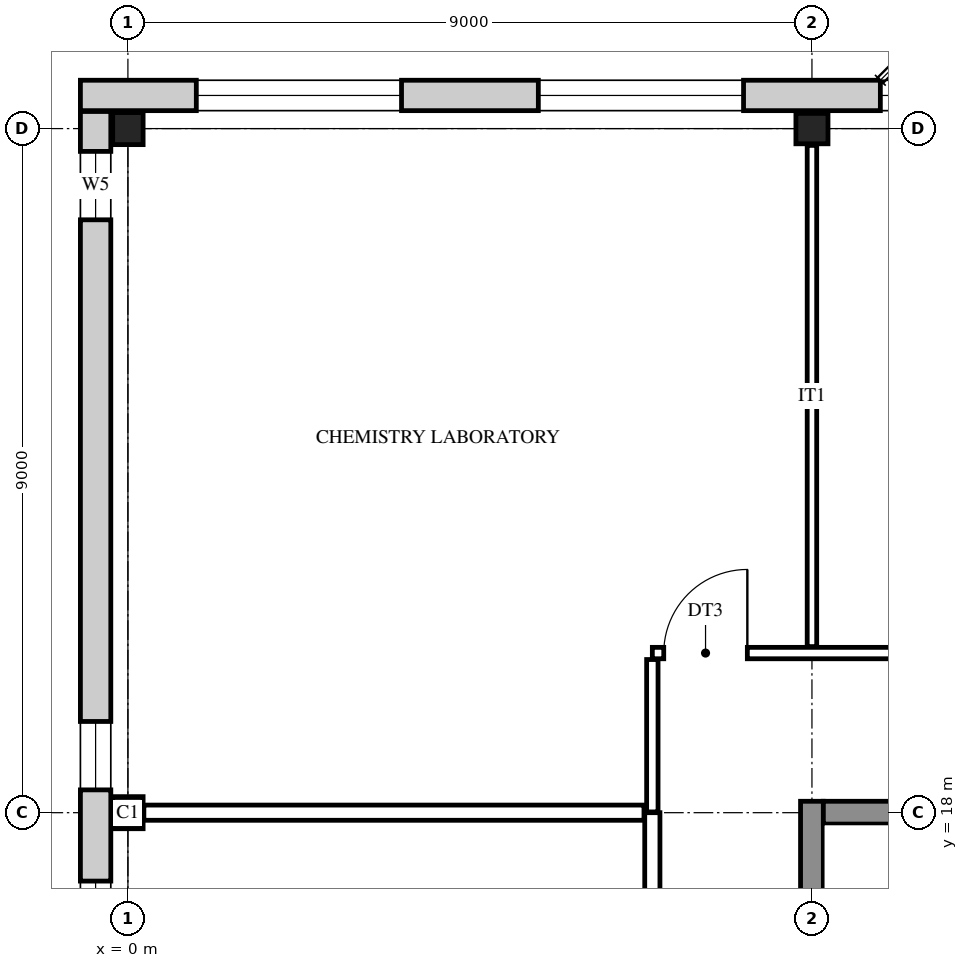
"""IFC4 building model, lengths in metres.
Left out: names, types, materials, properties, quantities, classifications, styles, units other than length and angle.
Written with IfcOpenShell. Run it as: python <this file> out.ifc"""

import sys

from ifc_helpers import new_model, si_unit, direction, frame, frame_2d, origin, origin_2d, place, context, subcontext, project, spatial, rectangle, i_section, extrude, element, fill, save


model = new_model("IFC4")
c1 = context("Model", 3, precision=1e-05, world=origin(), true_north=direction((0.0, 1.0)))
c2 = subcontext(c1, "Body", "Model", "MODEL_VIEW")
j1 = project(units=[si_unit("LENGTHUNIT", "METRE"), si_unit("PLANEANGLEUNIT", "RADIAN")], contexts=[c1])
p1 = place(None, origin())
s1 = spatial("IfcSite", under=j1, at=p1, CompositionType="ELEMENT")
p2 = place(p1, origin())
s2 = spatial("IfcBuilding", under=s1, at=p2, CompositionType="ELEMENT")
p3 = place(p2, frame((0.0, 0.0, 19.2)))
s3 = spatial("IfcBuildingStorey", under=s2, at=p3, CompositionType="ELEMENT", Elevation=19.2)
for number, where, z_axis, x_axis in (
    (1, (0.0, 18.0, 0.0), (0.0, 0.0, 1.0), (1.0, 0.0, 0.0)),
    (2, (0.0, 27.0, 0.0), (0.0, 0.0, 1.0), (1.0, 0.0, 0.0)),
    (3, (9.0, 27.0, 0.0), (0.0, 0.0, 1.0), (0.0, 1.0, 0.0)),
):
    element("IfcColumn", number, at=place(p3, frame(where, z_axis=z_axis, x_axis=x_axis)), inside=s3, PredefinedType="COLUMN", context=c2, shape_type="SweptSolid", body=[
        extrude(i_section(OverallWidth=0.4, OverallDepth=0.422, WebThickness=0.028, FlangeThickness=0.036, at=origin_2d()), origin(), (0.0, 0.0, 1.0), 4.2),
    ])
p4 = place(p3, frame((9.0, 8.85, 0.0), z_axis=(0.0, 0.0, 1.0), x_axis=(0.0, 1.0, 0.0)))
e4 = element("IfcWall", 4, at=p4, inside=s3, PredefinedType="SHEAR", context=c2, shape_type="SweptSolid", body=[
    extrude(rectangle(XDim=9.3, YDim=0.3, at=frame_2d((4.65, 0.0))), origin(), (0.0, 0.0, 1.0), 4.2),
])
p5 = place(p3, frame((9.15, 18.0, 0.0), z_axis=(0.0, 0.0, 1.0), x_axis=(1.0, 0.0, 0.0)))
e5 = element("IfcWall", 5, at=p5, inside=s3, PredefinedType="SHEAR", context=c2, shape_type="SweptSolid", body=[
    extrude(rectangle(XDim=4.2, YDim=0.3, at=frame_2d((2.1, 0.0))), origin(), (0.0, 0.0, 1.0), 4.2),
])
p6 = place(p3, frame((-0.425, -0.225, 0.0), z_axis=(0.0, 0.0, 1.0), x_axis=(0.0, 1.0, 0.0)))
e6 = element("IfcWall", 6, at=p6, inside=s3, PredefinedType="STANDARD", context=c2, shape_type="SweptSolid", body=[
    extrude(rectangle(XDim=27.45, YDim=0.4, at=frame_2d((13.725, 0.0))), origin(), (0.0, 0.0, 1.0), 4.2),
])
p7 = place(p6, frame((0.525, 0.0, 0.9)))
e7 = element("IfcOpeningElement", 7, at=p7, cuts=e6, PredefinedType="OPENING", context=c2, shape_type="SweptSolid", body=[
    extrude(rectangle(XDim=0.9, YDim=2.0, at=frame_2d((0.45, 1.0))), frame((0.0, 0.21, 0.0), z_axis=(0.0, -1.0, 0.0), x_axis=(1.0, 0.0, 0.0)), (0.0, 0.0, 1.0), 0.42),
])
p8 = place(p6, frame((8.025, 0.0, 0.9)))
e8 = element("IfcOpeningElement", 8, at=p8, cuts=e6, PredefinedType="OPENING", context=c2, shape_type="SweptSolid", body=[
    extrude(rectangle(XDim=0.9, YDim=2.0, at=frame_2d((0.45, 1.0))), frame((0.0, 0.21, 0.0), z_axis=(0.0, -1.0, 0.0), x_axis=(1.0, 0.0, 0.0)), (0.0, 0.0, 1.0), 0.42),
])
p9 = place(p6, frame((10.125, 0.0, 0.9)))
e9 = element("IfcOpeningElement", 9, at=p9, cuts=e6, PredefinedType="OPENING", context=c2, shape_type="SweptSolid", body=[
    extrude(rectangle(XDim=2.7, YDim=2.5, at=frame_2d((1.35, 1.25))), frame((0.0, 0.21, 0.0), z_axis=(0.0, -1.0, 0.0), x_axis=(1.0, 0.0, 0.0)), (0.0, 0.0, 1.0), 0.42),
])
p10 = place(p6, frame((14.625, 0.0, 0.9)))
e10 = element("IfcOpeningElement", 10, at=p10, cuts=e6, PredefinedType="OPENING", context=c2, shape_type="SweptSolid", body=[
    extrude(rectangle(XDim=2.7, YDim=2.5, at=frame_2d((1.35, 1.25))), frame((0.0, 0.21, 0.0), z_axis=(0.0, -1.0, 0.0), x_axis=(1.0, 0.0, 0.0)), (0.0, 0.0, 1.0), 0.42),
])
p11 = place(p6, frame((18.525, 0.0, 0.9)))
e11 = element("IfcOpeningElement", 11, at=p11, cuts=e6, PredefinedType="OPENING", context=c2, shape_type="SweptSolid", body=[
    extrude(rectangle(XDim=0.9, YDim=2.0, at=frame_2d((0.45, 1.0))), frame((0.0, 0.21, 0.0), z_axis=(0.0, -1.0, 0.0), x_axis=(1.0, 0.0, 0.0)), (0.0, 0.0, 1.0), 0.42),
])
p12 = place(p6, frame((26.025, 0.0, 0.9)))
e12 = element("IfcOpeningElement", 12, at=p12, cuts=e6, PredefinedType="OPENING", context=c2, shape_type="SweptSolid", body=[
    extrude(rectangle(XDim=0.9, YDim=2.0, at=frame_2d((0.45, 1.0))), frame((0.0, 0.21, 0.0), z_axis=(0.0, -1.0, 0.0), x_axis=(1.0, 0.0, 0.0)), (0.0, 0.0, 1.0), 0.42),
])
p13 = place(p3, frame((-0.625, 27.436, 0.0), z_axis=(0.0, 0.0, 1.0), x_axis=(1.0, 0.0, 0.0)))
e13 = element("IfcWall", 13, at=p13, inside=s3, PredefinedType="STANDARD", context=c2, shape_type="SweptSolid", body=[
    extrude(rectangle(XDim=32.75, YDim=0.4, at=frame_2d((16.375, 0.0))), origin(), (0.0, 0.0, 1.0), 4.2),
])
p14 = place(p13, frame((1.525, 0.0, 0.9)))
e14 = element("IfcOpeningElement", 14, at=p14, cuts=e13, PredefinedType="OPENING", context=c2, shape_type="SweptSolid", body=[
    extrude(rectangle(XDim=2.7, YDim=2.5, at=frame_2d((1.35, 1.25))), frame((0.0, 0.21, 0.0), z_axis=(0.0, -1.0, 0.0), x_axis=(1.0, 0.0, 0.0)), (0.0, 0.0, 1.0), 0.42),
])
p15 = place(p13, frame((6.025, 0.0, 0.9)))
e15 = element("IfcOpeningElement", 15, at=p15, cuts=e13, PredefinedType="OPENING", context=c2, shape_type="SweptSolid", body=[
    extrude(rectangle(XDim=2.7, YDim=2.5, at=frame_2d((1.35, 1.25))), frame((0.0, 0.21, 0.0), z_axis=(0.0, -1.0, 0.0), x_axis=(1.0, 0.0, 0.0)), (0.0, 0.0, 1.0), 0.42),
])
p16 = place(p13, frame((10.525, 0.0, 0.9)))
e16 = element("IfcOpeningElement", 16, at=p16, cuts=e13, PredefinedType="OPENING", context=c2, shape_type="SweptSolid", body=[
    extrude(rectangle(XDim=2.7, YDim=2.5, at=frame_2d((1.35, 1.25))), frame((0.0, 0.21, 0.0), z_axis=(0.0, -1.0, 0.0), x_axis=(1.0, 0.0, 0.0)), (0.0, 0.0, 1.0), 0.42),
])
p17 = place(p13, frame((15.025, 0.0, 0.9)))
e17 = element("IfcOpeningElement", 17, at=p17, cuts=e13, PredefinedType="OPENING", context=c2, shape_type="SweptSolid", body=[
    extrude(rectangle(XDim=2.7, YDim=2.5, at=frame_2d((1.35, 1.25))), frame((0.0, 0.21, 0.0), z_axis=(0.0, -1.0, 0.0), x_axis=(1.0, 0.0, 0.0)), (0.0, 0.0, 1.0), 0.42),
])
p18 = place(p13, frame((19.525, 0.0, 0.9)))
e18 = element("IfcOpeningElement", 18, at=p18, cuts=e13, PredefinedType="OPENING", context=c2, shape_type="SweptSolid", body=[
    extrude(rectangle(XDim=2.7, YDim=2.5, at=frame_2d((1.35, 1.25))), frame((0.0, 0.21, 0.0), z_axis=(0.0, -1.0, 0.0), x_axis=(1.0, 0.0, 0.0)), (0.0, 0.0, 1.0), 0.42),
])
p19 = place(p13, frame((24.025, 0.0, 0.9)))
e19 = element("IfcOpeningElement", 19, at=p19, cuts=e13, PredefinedType="OPENING", context=c2, shape_type="SweptSolid", body=[
    extrude(rectangle(XDim=2.7, YDim=2.5, at=frame_2d((1.35, 1.25))), frame((0.0, 0.21, 0.0), z_axis=(0.0, -1.0, 0.0), x_axis=(1.0, 0.0, 0.0)), (0.0, 0.0, 1.0), 0.42),
])
p20 = place(p13, frame((28.525, 0.0, 0.9)))
e20 = element("IfcOpeningElement", 20, at=p20, cuts=e13, PredefinedType="OPENING", context=c2, shape_type="SweptSolid", body=[
    extrude(rectangle(XDim=2.7, YDim=2.5, at=frame_2d((1.35, 1.25))), frame((0.0, 0.21, 0.0), z_axis=(0.0, -1.0, 0.0), x_axis=(1.0, 0.0, 0.0)), (0.0, 0.0, 1.0), 0.42),
])
p21 = place(p3, frame((6.9, 9.0, 0.0), z_axis=(0.0, 0.0, 1.0), x_axis=(0.0, 1.0, 0.0)))
e21 = element("IfcWall", 21, at=p21, inside=s3, PredefinedType="PARTITIONING", context=c2, shape_type="SweptSolid", body=[
    extrude(rectangle(XDim=9.0, YDim=0.2, at=frame_2d((4.5, 0.0))), origin(), (0.0, 0.0, 1.0), 3.537),
])
p22 = place(p21, frame((1.75, 0.0, 0.0)))
e22 = element("IfcOpeningElement", 22, at=p22, cuts=e21, PredefinedType="OPENING", context=c2, shape_type="SweptSolid", body=[
    extrude(rectangle(XDim=1.0, YDim=2.1, at=frame_2d((0.5, 1.05))), frame((0.0, 0.11, 0.0), z_axis=(0.0, -1.0, 0.0), x_axis=(1.0, 0.0, 0.0)), (0.0, 0.0, 1.0), 0.22),
])
p23 = place(p21, frame((6.25, 0.0, 0.0)))
e23 = element("IfcOpeningElement", 23, at=p23, cuts=e21, PredefinedType="OPENING", context=c2, shape_type="SweptSolid", body=[
    extrude(rectangle(XDim=1.0, YDim=2.1, at=frame_2d((0.5, 1.05))), frame((0.0, 0.11, 0.0), z_axis=(0.0, -1.0, 0.0), x_axis=(1.0, 0.0, 0.0)), (0.0, 0.0, 1.0), 0.22),
])
p24 = place(p3, frame((6.9, 18.01, 0.0), z_axis=(0.0, 0.0, 1.0), x_axis=(0.0, 1.0, 0.0)))
e24 = element("IfcWall", 24, at=p24, inside=s3, PredefinedType="PARTITIONING", context=c2, shape_type="SweptSolid", body=[
    extrude(rectangle(XDim=2.005, YDim=0.15, at=frame_2d((1.002, 0.0))), origin(), (0.0, 0.0, 1.0), 3.537),
])
p25 = place(p3, frame((9.0, 20.185, 0.0), z_axis=(0.0, 0.0, 1.0), x_axis=(0.0, 1.0, 0.0)))
e25 = element("IfcWall", 25, at=p25, inside=s3, PredefinedType="PARTITIONING", context=c2, shape_type="SweptSolid", body=[
    extrude(rectangle(XDim=6.594, YDim=0.125, at=frame_2d((3.297, 0.0))), origin(), (0.0, 0.0, 1.0), 3.537),
])
p26 = place(p3, frame((0.21, 18.0, 0.0), z_axis=(0.0, 0.0, 1.0), x_axis=(1.0, 0.0, 0.0)))
e26 = element("IfcWall", 26, at=p26, inside=s3, PredefinedType="PARTITIONING", context=c2, shape_type="SweptSolid", body=[
    extrude(rectangle(XDim=6.58, YDim=0.2, at=frame_2d((3.29, 0.0))), origin(), (0.0, 0.0, 1.0), 3.537),
])
p27 = place(p3, frame((6.9, 20.1, 0.0), z_axis=(0.0, 0.0, 1.0), x_axis=(1.0, 0.0, 0.0)))
e27 = element("IfcWall", 27, at=p27, inside=s3, PredefinedType="PARTITIONING", context=c2, shape_type="SweptSolid", body=[
    extrude(rectangle(XDim=20.1, YDim=0.15, at=frame_2d((10.05, 0.0))), origin(), (0.0, 0.0, 1.0), 3.537),
])
p28 = place(p27, frame((0.15, 0.0, 0.0)))
e28 = element("IfcOpeningElement", 28, at=p28, cuts=e27, PredefinedType="OPENING", context=c2, shape_type="SweptSolid", body=[
    extrude(rectangle(XDim=1.1, YDim=2.1, at=frame_2d((0.55, 1.05))), frame((0.0, 0.085, 0.0), z_axis=(0.0, -1.0, 0.0), x_axis=(1.0, 0.0, 0.0)), (0.0, 0.0, 1.0), 0.17),
])
p29 = place(p27, frame((6.05, 0.0, 0.0)))
e29 = element("IfcOpeningElement", 29, at=p29, cuts=e27, PredefinedType="OPENING", context=c2, shape_type="SweptSolid", body=[
    extrude(rectangle(XDim=1.1, YDim=2.1, at=frame_2d((0.55, 1.05))), frame((0.0, 0.085, 0.0), z_axis=(0.0, -1.0, 0.0), x_axis=(1.0, 0.0, 0.0)), (0.0, 0.0, 1.0), 0.17),
])
p30 = place(p27, frame((16.25, 0.0, 0.0)))
e30 = element("IfcOpeningElement", 30, at=p30, cuts=e27, PredefinedType="OPENING", context=c2, shape_type="SweptSolid", body=[
    extrude(rectangle(XDim=1.1, YDim=2.1, at=frame_2d((0.55, 1.05))), frame((0.0, 0.085, 0.0), z_axis=(0.0, -1.0, 0.0), x_axis=(1.0, 0.0, 0.0)), (0.0, 0.0, 1.0), 0.17),
])
p31 = place(p10, origin())
e31 = element("IfcWindow", 31, at=p31, inside=s3, PartitioningType="SINGLE_PANEL", PredefinedType="WINDOW", context=c2, shape_type="SweptSolid", body=[
    extrude(rectangle(XDim=2.7, YDim=2.5, at=frame_2d((1.35, 1.25))), frame((0.0, 0.03, 0.0), z_axis=(0.0, -1.0, 0.0), x_axis=(1.0, 0.0, 0.0)), (0.0, 0.0, 1.0), 0.06),
])
fill(e10, e31)
p32 = place(p11, origin())
e32 = element("IfcWindow", 32, at=p32, inside=s3, PartitioningType="SINGLE_PANEL", PredefinedType="WINDOW", context=c2, shape_type="SweptSolid", body=[
    extrude(rectangle(XDim=0.9, YDim=2.0, at=frame_2d((0.45, 1.0))), frame((0.0, 0.03, 0.0), z_axis=(0.0, -1.0, 0.0), x_axis=(1.0, 0.0, 0.0)), (0.0, 0.0, 1.0), 0.06),
])
fill(e11, e32)
p33 = place(p12, origin())
e33 = element("IfcWindow", 33, at=p33, inside=s3, PartitioningType="SINGLE_PANEL", PredefinedType="WINDOW", context=c2, shape_type="SweptSolid", body=[
    extrude(rectangle(XDim=0.9, YDim=2.0, at=frame_2d((0.45, 1.0))), frame((0.0, 0.03, 0.0), z_axis=(0.0, -1.0, 0.0), x_axis=(1.0, 0.0, 0.0)), (0.0, 0.0, 1.0), 0.06),
])
fill(e12, e33)
p34 = place(p14, origin())
e34 = element("IfcWindow", 34, at=p34, inside=s3, PartitioningType="SINGLE_PANEL", PredefinedType="WINDOW", context=c2, shape_type="SweptSolid", body=[
    extrude(rectangle(XDim=2.7, YDim=2.5, at=frame_2d((1.35, 1.25))), frame((0.0, 0.03, 0.0), z_axis=(0.0, -1.0, 0.0), x_axis=(1.0, 0.0, 0.0)), (0.0, 0.0, 1.0), 0.06),
])
fill(e14, e34)
p35 = place(p15, origin())
e35 = element("IfcWindow", 35, at=p35, inside=s3, PartitioningType="SINGLE_PANEL", PredefinedType="WINDOW", context=c2, shape_type="SweptSolid", body=[
    extrude(rectangle(XDim=2.7, YDim=2.5, at=frame_2d((1.35, 1.25))), frame((0.0, 0.03, 0.0), z_axis=(0.0, -1.0, 0.0), x_axis=(1.0, 0.0, 0.0)), (0.0, 0.0, 1.0), 0.06),
])
fill(e15, e35)
p36 = place(p16, origin())
e36 = element("IfcWindow", 36, at=p36, inside=s3, PartitioningType="SINGLE_PANEL", PredefinedType="WINDOW", context=c2, shape_type="SweptSolid", body=[
    extrude(rectangle(XDim=2.7, YDim=2.5, at=frame_2d((1.35, 1.25))), frame((0.0, 0.03, 0.0), z_axis=(0.0, -1.0, 0.0), x_axis=(1.0, 0.0, 0.0)), (0.0, 0.0, 1.0), 0.06),
])
fill(e16, e36)
p37 = place(p28, origin())
e37 = element("IfcDoor", 37, at=p37, inside=s3, OperationType="SINGLE_SWING_RIGHT", PredefinedType="DOOR", context=c2, shape_type="SweptSolid", body=[
    extrude(rectangle(XDim=1.1, YDim=2.1, at=frame_2d((0.55, 1.05))), frame((0.0, 0.025, 0.0), z_axis=(0.0, -1.0, 0.0), x_axis=(1.0, 0.0, 0.0)), (0.0, 0.0, 1.0), 0.05),
])
fill(e28, e37)
save(model, sys.argv[1])
